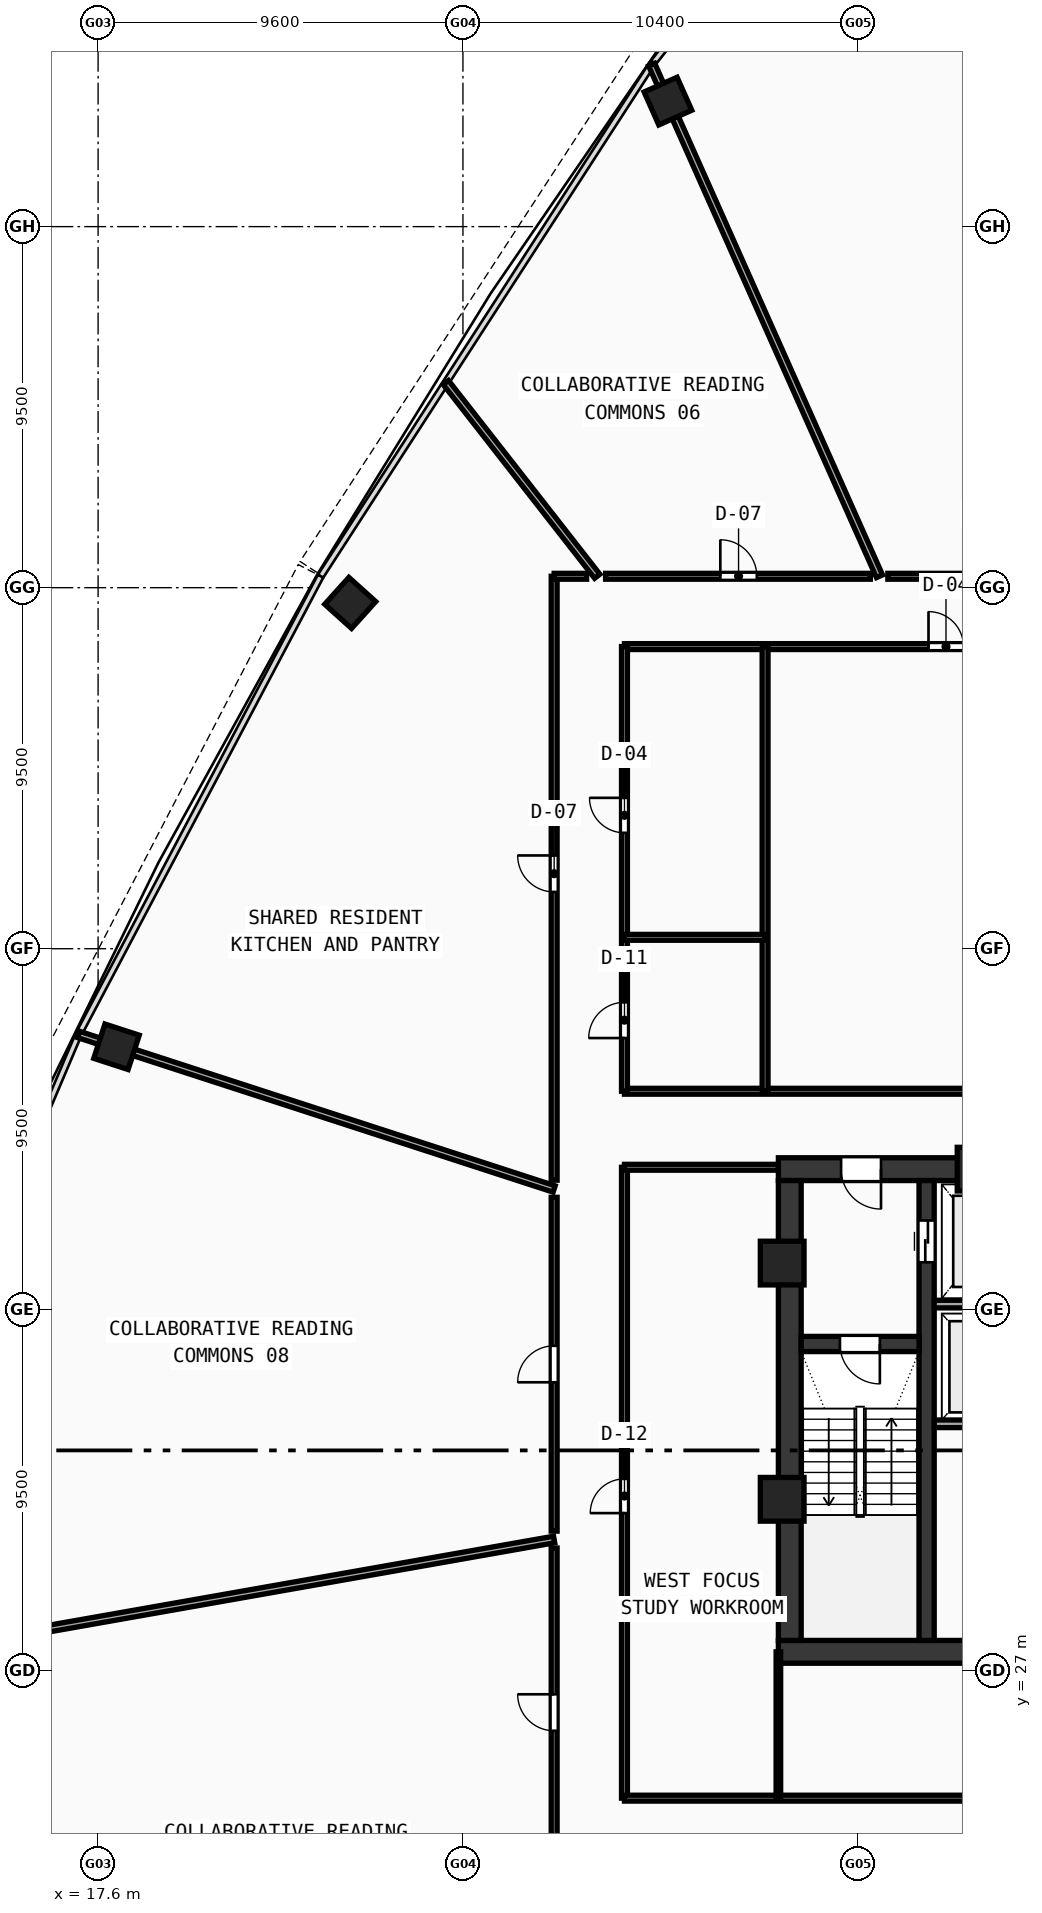
"""IFC4 building model, lengths in metres.
Left out: names, types, materials, properties, quantities, classifications, styles, units other than length and angle.
Written with IfcOpenShell. Run it as: python <this file> out.ifc"""

import sys

from ifc_helpers import new_model, si_unit, direction, frame, frame_2d, origin, origin_with_axes, origin_2d, place, context, subcontext, project, spatial, rectangle, hollow_rectangle, extrude, source, transform, mapped, element, fill, save


model = new_model("IFC4")
c1 = context("Model", 3, precision=1e-05, world=origin(), true_north=direction((0.0, 1.0)))
c2 = subcontext(c1, "Body", "Model", "MODEL_VIEW")
j1 = project(units=[si_unit("LENGTHUNIT", "METRE"), si_unit("PLANEANGLEUNIT", "RADIAN")], contexts=[c1])
p1 = place(None, origin())
s1 = spatial("IfcSite", under=j1, at=p1, CompositionType="ELEMENT")
p2 = place(p1, origin())
s2 = spatial("IfcBuilding", under=s1, at=p2, CompositionType="ELEMENT")
p3 = place(p2, frame((0.0, 0.0, 162.95)))
s3 = spatial("IfcBuildingStorey", under=s2, at=p3, CompositionType="ELEMENT", Elevation=162.95)
p4 = place(p3, frame((35.5, 27.5, 0.0), z_axis=(0.0, 0.0, 1.0), x_axis=(1.0, 0.0, 0.0)))
e1 = element("IfcWall", 1, at=p4, inside=s3, PredefinedType="SHEAR", context=c2, shape_type="SweptSolid", body=[
    extrude(rectangle(XDim=25.0, YDim=0.6, at=frame_2d((12.5, 0.0))), origin(), (0.0, 0.0, 1.0), 3.42),
])
p5 = place(p3, frame((35.5, 40.2, 0.0), z_axis=(0.0, 0.0, 1.0), x_axis=(1.0, 0.0, 0.0)))
e2 = element("IfcWall", 2, at=p5, inside=s3, PredefinedType="SHEAR", context=c2, shape_type="SweptSolid", body=[
    extrude(rectangle(XDim=11.3, YDim=0.6, at=frame_2d((5.65, 0.0))), origin(), (0.0, 0.0, 1.0), 3.42),
])
p6 = place(p5, frame((1.65, 0.0, 0.0)))
e3 = element("IfcOpeningElement", 3, at=p6, cuts=e2, PredefinedType="OPENING", context=c2, shape_type="SweptSolid", body=[
    extrude(rectangle(XDim=1.05, YDim=2.1, at=frame_2d((0.525, 1.05))), frame((0.0, 0.31, 0.0), z_axis=(0.0, -1.0, 0.0), x_axis=(1.0, 0.0, 0.0)), (0.0, 0.0, 1.0), 0.62),
])
p7 = place(p3, frame((35.8, 27.8, 0.0), z_axis=(0.0, 0.0, 1.0), x_axis=(0.0, 1.0, 0.0)))
e4 = element("IfcWall", 4, at=p7, inside=s3, PredefinedType="SHEAR", context=c2, shape_type="SweptSolid", body=[
    extrude(rectangle(XDim=12.1, YDim=0.6, at=frame_2d((6.05, 0.0))), origin(), (0.0, 0.0, 1.0), 3.42),
])
p8 = place(p3, frame((39.4, 27.8, 0.0), z_axis=(0.0, 0.0, 1.0), x_axis=(0.0, 1.0, 0.0)))
e5 = element("IfcWall", 5, at=p8, inside=s3, PredefinedType="SHEAR", context=c2, shape_type="SweptSolid", body=[
    extrude(rectangle(XDim=12.1, YDim=0.4, at=frame_2d((6.05, 0.0))), origin(), (0.0, 0.0, 1.0), 3.42),
])
p9 = place(p8, frame((9.95, 0.0, 0.0)))
e6 = element("IfcOpeningElement", 6, at=p9, cuts=e5, PredefinedType="OPENING", context=c2, shape_type="SweptSolid", body=[
    extrude(rectangle(XDim=1.1, YDim=2.1, at=frame_2d((0.55, 1.05))), frame((0.0, 0.21, 0.0), z_axis=(0.0, -1.0, 0.0), x_axis=(1.0, 0.0, 0.0)), (0.0, 0.0, 1.0), 0.42),
])
p10 = place(p3, frame((36.1, 35.6, 0.0), z_axis=(0.0, 0.0, 1.0), x_axis=(1.0, 0.0, 0.0)))
e7 = element("IfcWall", 7, at=p10, inside=s3, PredefinedType="SHEAR", context=c2, shape_type="SweptSolid", body=[
    extrude(rectangle(XDim=3.1, YDim=0.4, at=frame_2d((1.55, 0.0))), origin(), (0.0, 0.0, 1.0), 3.42),
])
p11 = place(p10, frame((1.02, 0.0, 0.0)))
e8 = element("IfcOpeningElement", 8, at=p11, cuts=e7, PredefinedType="OPENING", context=c2, shape_type="SweptSolid", body=[
    extrude(rectangle(XDim=1.05, YDim=2.1, at=frame_2d((0.525, 1.05))), frame((0.0, 0.21, 0.0), z_axis=(0.0, -1.0, 0.0), x_axis=(1.0, 0.0, 0.0)), (0.0, 0.0, 1.0), 0.42),
])
m1 = source(origin(), c2, "Body", "SweptSolid", [
    extrude(hollow_rectangle(XDim=1.15, YDim=1.15, WallThickness=0.048, at=origin_2d()), origin(), (0.0, 0.0, 1.0), 3.68),
])
for number, where, z_axis, x_axis in (
    (9, (40.781, 40.2, -0.26), (0.0, 0.0, 1.0), (1.0, 0.0, 0.0)),
    (10, (35.6, 37.729, -0.26), (0.0, 0.0, 1.0), (1.0, 0.0, 0.0)),
    (11, (35.6, 31.513, -0.26), (0.0, 0.0, 1.0), (1.0, 0.0, 0.0)),
):
    element("IfcColumn", number, at=place(p3, frame(where, z_axis=z_axis, x_axis=x_axis)), inside=s3, PredefinedType="COLUMN", context=c2, shape_type="MappedRepresentation", body=[
        mapped(m1, transform((0.0, 0.0, 0.0), scale=1.0)),
    ])
m2 = source(origin(), c2, "Body", "SweptSolid", [
    extrude(hollow_rectangle(XDim=0.95, YDim=0.95, WallThickness=0.04, at=origin_2d()), origin(), (0.0, 0.0, 1.0), 3.68),
])
for number, where, z_axis, x_axis in (
    (12, (32.594, 68.303, -0.26), (0.0, 0.0, 1.0), (-0.914, -0.407, 0.0)),
    (13, (24.234, 55.099, -0.26), (0.0, 0.0, 1.0), (-0.669, -0.743, 0.0)),
    (14, (18.085, 43.42, -0.26), (0.0, 0.0, 1.0), (-0.309, -0.951, 0.0)),
):
    element("IfcColumn", number, at=place(p3, frame(where, z_axis=z_axis, x_axis=x_axis)), inside=s3, PredefinedType="COLUMN", context=c2, shape_type="MappedRepresentation", body=[
        mapped(m2, transform((0.0, 0.0, 0.0), scale=1.0)),
    ])
for number, where, z_axis, x_axis in (
    (15, (39.6, 36.65, 0.0), (0.0, 0.0, 1.0), (1.0, 0.0, 0.0)),
    (16, (39.6, 33.5, 0.0), (0.0, 0.0, 1.0), (1.0, 0.0, 0.0)),
):
    element("IfcWall", number, at=place(p3, frame(where, z_axis=z_axis, x_axis=x_axis)), inside=s3, PredefinedType="SOLIDWALL", context=c2, shape_type="SweptSolid", body=[
        extrude(rectangle(XDim=2.72, YDim=0.2, at=frame_2d((1.36, 0.0))), origin(), (0.0, 0.0, 1.0), 3.42),
    ])
p12 = place(p3, frame((31.45, 42.25, 0.0), z_axis=(0.0, 0.0, 1.0), x_axis=(1.0, 0.0, 0.0)))
e17 = element("IfcWall", 17, at=p12, inside=s3, PredefinedType="PARTITIONING", context=c2, shape_type="SweptSolid", body=[
    extrude(rectangle(XDim=33.1, YDim=0.155, at=frame_2d((16.55, 0.0))), origin(), (0.0, 0.0, 1.0), 2.77),
])
p13 = place(p3, frame((31.45, 53.95, 0.0), z_axis=(0.0, 0.0, 1.0), x_axis=(1.0, 0.0, 0.0)))
e18 = element("IfcWall", 18, at=p13, inside=s3, PredefinedType="PARTITIONING", context=c2, shape_type="SweptSolid", body=[
    extrude(rectangle(XDim=33.1, YDim=0.155, at=frame_2d((16.55, 0.0))), origin(), (0.0, 0.0, 1.0), 2.77),
])
p14 = place(p13, frame((8.0, 0.0, 0.0)))
e19 = element("IfcOpeningElement", 19, at=p14, cuts=e18, PredefinedType="OPENING", context=c2, shape_type="SweptSolid", body=[
    extrude(rectangle(XDim=0.92, YDim=2.1, at=frame_2d((0.46, 1.05))), frame((0.0, 0.087, 0.0), z_axis=(0.0, -1.0, 0.0), x_axis=(1.0, 0.0, 0.0)), (0.0, 0.0, 1.0), 0.175),
])
p15 = place(p13, frame((24.05, 0.0, 0.0)))
e20 = element("IfcOpeningElement", 20, at=p15, cuts=e18, PredefinedType="OPENING", context=c2, shape_type="SweptSolid", body=[
    extrude(rectangle(XDim=0.92, YDim=2.1, at=frame_2d((0.46, 1.05))), frame((0.0, 0.087, 0.0), z_axis=(0.0, -1.0, 0.0), x_axis=(1.0, 0.0, 0.0)), (0.0, 0.0, 1.0), 0.175),
])
p16 = place(p3, frame((31.45, 42.25, 0.0), z_axis=(0.0, 0.0, 1.0), x_axis=(0.0, 1.0, 0.0)))
e21 = element("IfcWall", 21, at=p16, inside=s3, PredefinedType="PARTITIONING", context=c2, shape_type="SweptSolid", body=[
    extrude(rectangle(XDim=11.7, YDim=0.155, at=frame_2d((5.85, 0.0))), origin(), (0.0, 0.0, 1.0), 2.77),
])
p17 = place(p16, frame((1.4, 0.0, 0.0)))
e22 = element("IfcOpeningElement", 22, at=p17, cuts=e21, PredefinedType="OPENING", context=c2, shape_type="SweptSolid", body=[
    extrude(rectangle(XDim=0.94, YDim=2.1, at=frame_2d((0.47, 1.05))), frame((0.0, 0.087, 0.0), z_axis=(0.0, -1.0, 0.0), x_axis=(1.0, 0.0, 0.0)), (0.0, 0.0, 1.0), 0.175),
])
p18 = place(p16, frame((6.8, 0.0, 0.0)))
e23 = element("IfcOpeningElement", 23, at=p18, cuts=e21, PredefinedType="OPENING", context=c2, shape_type="SweptSolid", body=[
    extrude(rectangle(XDim=0.92, YDim=2.1, at=frame_2d((0.46, 1.05))), frame((0.0, 0.087, 0.0), z_axis=(0.0, -1.0, 0.0), x_axis=(1.0, 0.0, 0.0)), (0.0, 0.0, 1.0), 0.175),
])
p19 = place(p3, frame((35.15, 42.25, 0.0), z_axis=(0.0, 0.0, 1.0), x_axis=(0.0, 1.0, 0.0)))
e24 = element("IfcWall", 24, at=p19, inside=s3, PredefinedType="PARTITIONING", context=c2, shape_type="SweptSolid", body=[
    extrude(rectangle(XDim=11.7, YDim=0.155, at=frame_2d((5.85, 0.0))), origin(), (0.0, 0.0, 1.0), 2.77),
])
p20 = place(p3, frame((31.45, 46.3, 0.0), z_axis=(0.0, 0.0, 1.0), x_axis=(1.0, 0.0, 0.0)))
e25 = element("IfcWall", 25, at=p20, inside=s3, PredefinedType="PARTITIONING", context=c2, shape_type="SweptSolid", body=[
    extrude(rectangle(XDim=3.7, YDim=0.155, at=frame_2d((1.85, 0.0))), origin(), (0.0, 0.0, 1.0), 2.77),
])
p21 = place(p3, frame((31.45, 23.65, 0.0), z_axis=(0.0, 0.0, 1.0), x_axis=(0.0, 1.0, 0.0)))
e26 = element("IfcWall", 26, at=p21, inside=s3, PredefinedType="PARTITIONING", context=c2, shape_type="SweptSolid", body=[
    extrude(rectangle(XDim=16.6, YDim=0.155, at=frame_2d((8.3, 0.0))), origin(), (0.0, 0.0, 1.0), 2.77),
])
p22 = place(p21, frame((7.5, 0.0, 0.0)))
e27 = element("IfcOpeningElement", 27, at=p22, cuts=e26, PredefinedType="OPENING", context=c2, shape_type="SweptSolid", body=[
    extrude(rectangle(XDim=0.9, YDim=2.08, at=frame_2d((0.45, 1.04))), frame((0.0, 0.087, 0.0), z_axis=(0.0, -1.0, 0.0), x_axis=(1.0, 0.0, 0.0)), (0.0, 0.0, 1.0), 0.175),
])
p23 = place(p3, frame((31.45, 23.65, 0.0), z_axis=(0.0, 0.0, 1.0), x_axis=(1.0, 0.0, 0.0)))
e28 = element("IfcWall", 28, at=p23, inside=s3, PredefinedType="PARTITIONING", context=c2, shape_type="SweptSolid", body=[
    extrude(rectangle(XDim=33.1, YDim=0.155, at=frame_2d((16.55, 0.0))), origin(), (0.0, 0.0, 1.0), 2.77),
])
p24 = place(p23, frame((16.0, 0.0, 0.0)))
e29 = element("IfcOpeningElement", 29, at=p24, cuts=e28, PredefinedType="OPENING", context=c2, shape_type="SweptSolid", body=[
    extrude(rectangle(XDim=0.92, YDim=2.1, at=frame_2d((0.46, 1.05))), frame((0.0, 0.087, 0.0), z_axis=(0.0, -1.0, 0.0), x_axis=(1.0, 0.0, 0.0)), (0.0, 0.0, 1.0), 0.175),
])
p25 = place(p3, frame((31.45, 40.25, 0.0), z_axis=(0.0, 0.0, 1.0), x_axis=(1.0, 0.0, 0.0)))
e30 = element("IfcWall", 30, at=p25, inside=s3, PredefinedType="PARTITIONING", context=c2, shape_type="SweptSolid", body=[
    extrude(rectangle(XDim=4.05, YDim=0.155, at=frame_2d((2.025, 0.0))), origin(), (0.0, 0.0, 1.0), 3.42),
])
p26 = place(p3, frame((35.5, 23.65, 0.0), z_axis=(0.0, 0.0, 1.0), x_axis=(0.0, 1.0, 0.0)))
e31 = element("IfcWall", 31, at=p26, inside=s3, PredefinedType="PARTITIONING", context=c2, shape_type="SweptSolid", body=[
    extrude(rectangle(XDim=3.85, YDim=0.12, at=frame_2d((1.925, 0.0))), origin(), (0.0, 0.0, 1.0), 3.02),
])
p27 = place(p3, frame((38.16, 55.8, 0.0), z_axis=(0.0, 0.0, 1.0), x_axis=(-0.406737891531, 0.913544901793, 0.0)))
e32 = element("IfcWall", 32, at=p27, inside=s3, PredefinedType="PARTITIONING", context=c2, shape_type="SweptSolid", body=[
    extrude(rectangle(XDim=14.736, YDim=0.175, at=frame_2d((7.368, 0.0))), origin(), (0.0, 0.0, 1.0), 2.77),
])
p28 = place(p3, frame((30.734, 55.8, 0.0), z_axis=(0.0, 0.0, 1.0), x_axis=(-0.615677005502, 0.787998619857, 0.0)))
e33 = element("IfcWall", 33, at=p28, inside=s3, PredefinedType="PARTITIONING", context=c2, shape_type="SweptSolid", body=[
    extrude(rectangle(XDim=6.468, YDim=0.175, at=frame_2d((3.234, 0.0))), origin(), (0.0, 0.0, 1.0), 2.77),
])
p29 = place(p3, frame((29.6, 39.678, 0.0), z_axis=(0.0, 0.0, 1.0), x_axis=(-0.951058745875, 0.309010132349, 0.0)))
e34 = element("IfcWall", 34, at=p29, inside=s3, PredefinedType="PARTITIONING", context=c2, shape_type="SweptSolid", body=[
    extrude(rectangle(XDim=13.158, YDim=0.175, at=frame_2d((6.579, 0.0))), origin(), (0.0, 0.0, 1.0), 2.77),
])
p30 = place(p3, frame((29.6, 30.456, 0.0), z_axis=(0.0, 0.0, 1.0), x_axis=(-0.984808700761, -0.173642802629, 0.0)))
e35 = element("IfcWall", 35, at=p30, inside=s3, PredefinedType="PARTITIONING", context=c2, shape_type="SweptSolid", body=[
    extrude(rectangle(XDim=19.934, YDim=0.175, at=frame_2d((9.967, 0.0))), origin(), (0.0, 0.0, 1.0), 2.77),
])
p31 = place(p3, frame((29.6, 21.8, 0.0), z_axis=(0.0, 0.0, 1.0), x_axis=(0.0, 1.0, 0.0)))
e36 = element("IfcWall", 36, at=p31, inside=s3, PredefinedType="PARTITIONING", context=c2, shape_type="SweptSolid", body=[
    extrude(rectangle(XDim=8.432, YDim=0.155, at=frame_2d((4.216, 0.0))), origin(), (0.0, 0.0, 1.0), 3.02),
])
p32 = place(p31, frame((3.623, 0.0, 0.0)))
e37 = element("IfcOpeningElement", 37, at=p32, cuts=e36, PredefinedType="OPENING", context=c2, shape_type="SweptSolid", body=[
    extrude(rectangle(XDim=0.96, YDim=2.12, at=frame_2d((0.48, 1.06))), frame((0.0, 0.087, 0.0), z_axis=(0.0, -1.0, 0.0), x_axis=(1.0, 0.0, 0.0)), (0.0, 0.0, 1.0), 0.175),
])
p33 = place(p3, frame((29.6, 30.675, 0.0), z_axis=(0.0, 0.0, 1.0), x_axis=(0.0, 1.0, 0.0)))
e38 = element("IfcWall", 38, at=p33, inside=s3, PredefinedType="PARTITIONING", context=c2, shape_type="SweptSolid", body=[
    extrude(rectangle(XDim=8.783, YDim=0.155, at=frame_2d((4.392, 0.0))), origin(), (0.0, 0.0, 1.0), 3.42),
])
p34 = place(p33, frame((3.917, 0.0, 0.0)))
e39 = element("IfcOpeningElement", 39, at=p34, cuts=e38, PredefinedType="OPENING", context=c2, shape_type="SweptSolid", body=[
    extrude(rectangle(XDim=0.96, YDim=2.12, at=frame_2d((0.48, 1.06))), frame((0.0, 0.087, 0.0), z_axis=(0.0, -1.0, 0.0), x_axis=(1.0, 0.0, 0.0)), (0.0, 0.0, 1.0), 0.175),
])
p35 = place(p3, frame((29.6, 39.91, 0.0), z_axis=(0.0, 0.0, 1.0), x_axis=(0.0, 1.0, 0.0)))
e40 = element("IfcWall", 40, at=p35, inside=s3, PredefinedType="PARTITIONING", context=c2, shape_type="SweptSolid", body=[
    extrude(rectangle(XDim=15.89, YDim=0.155, at=frame_2d((7.945, 0.0))), origin(), (0.0, 0.0, 1.0), 2.77),
])
p36 = place(p35, frame((7.584, 0.0, 0.0)))
e41 = element("IfcOpeningElement", 41, at=p36, cuts=e40, PredefinedType="OPENING", context=c2, shape_type="SweptSolid", body=[
    extrude(rectangle(XDim=0.96, YDim=2.12, at=frame_2d((0.48, 1.06))), frame((0.0, 0.087, 0.0), z_axis=(0.0, -1.0, 0.0), x_axis=(1.0, 0.0, 0.0)), (0.0, 0.0, 1.0), 0.175),
])
p37 = place(p3, frame((29.6, 55.8, 0.0), z_axis=(0.0, 0.0, 1.0), x_axis=(1.0, 0.0, 0.0)))
e42 = element("IfcWall", 42, at=p37, inside=s3, PredefinedType="PARTITIONING", context=c2, shape_type="SweptSolid", body=[
    extrude(rectangle(XDim=0.854, YDim=0.155, at=frame_2d((0.427, 0.0))), origin(), (0.0, 0.0, 1.0), 3.42),
])
p38 = place(p3, frame((30.953, 55.8, 0.0), z_axis=(0.0, 0.0, 1.0), x_axis=(1.0, 0.0, 0.0)))
e43 = element("IfcWall", 43, at=p38, inside=s3, PredefinedType="PARTITIONING", context=c2, shape_type="SweptSolid", body=[
    extrude(rectangle(XDim=6.966, YDim=0.155, at=frame_2d((3.483, 0.0))), origin(), (0.0, 0.0, 1.0), 3.02),
])
p39 = place(p38, frame((3.019, 0.0, 0.0)))
e44 = element("IfcOpeningElement", 44, at=p39, cuts=e43, PredefinedType="OPENING", context=c2, shape_type="SweptSolid", body=[
    extrude(rectangle(XDim=0.96, YDim=2.12, at=frame_2d((0.48, 1.06))), frame((0.0, 0.087, 0.0), z_axis=(0.0, -1.0, 0.0), x_axis=(1.0, 0.0, 0.0)), (0.0, 0.0, 1.0), 0.175),
])
p40 = place(p3, frame((38.38, 55.8, 0.0), z_axis=(0.0, 0.0, 1.0), x_axis=(1.0, 0.0, 0.0)))
e45 = element("IfcWall", 45, at=p40, inside=s3, PredefinedType="PARTITIONING", context=c2, shape_type="SweptSolid", body=[
    extrude(rectangle(XDim=5.329, YDim=0.155, at=frame_2d((2.665, 0.0))), origin(), (0.0, 0.0, 1.0), 2.77),
])
p41 = place(p40, frame((2.115, 0.0, 0.0)))
e46 = element("IfcOpeningElement", 46, at=p41, cuts=e45, PredefinedType="OPENING", context=c2, shape_type="SweptSolid", body=[
    extrude(rectangle(XDim=0.96, YDim=2.12, at=frame_2d((0.48, 1.06))), frame((0.0, 0.087, 0.0), z_axis=(0.0, -1.0, 0.0), x_axis=(1.0, 0.0, 0.0)), (0.0, 0.0, 1.0), 0.175),
])
m3 = source(origin(), c2, "Body", "SweptSolid", [
    extrude(rectangle(XDim=1.05, YDim=2.1, at=frame_2d((0.525, 1.05))), frame((0.0, 0.025, 0.0), z_axis=(0.0, -1.0, 0.0), x_axis=(1.0, 0.0, 0.0)), (0.0, 0.0, 1.0), 0.05),
])
p42 = place(p11, frame((1.05, 0.0, 0.0), z_axis=(0.0, 0.0, 1.0), x_axis=(-1.0, 0.0, 0.0)))
e47 = element("IfcDoor", 47, at=p42, inside=s3, OperationType="SINGLE_SWING_LEFT", PredefinedType="DOOR", context=c2, shape_type="MappedRepresentation", body=[
    mapped(m3, transform((0.0, 0.0, 0.0), scale=1.0)),
])
fill(e8, e47)
p43 = place(p6, frame((1.05, 0.0, 0.0), z_axis=(0.0, 0.0, 1.0), x_axis=(-1.0, 0.0, 0.0)))
e48 = element("IfcDoor", 48, at=p43, inside=s3, OperationType="SINGLE_SWING_LEFT", PredefinedType="DOOR", context=c2, shape_type="MappedRepresentation", body=[
    mapped(m3, transform((0.0, 0.0, 0.0), scale=1.0)),
])
fill(e3, e48)
m4 = source(origin(), c2, "Body", "SweptSolid", [
    extrude(rectangle(XDim=1.1, YDim=2.1, at=frame_2d((0.55, 1.05))), frame((0.0, 0.025, 0.0), z_axis=(0.0, -1.0, 0.0), x_axis=(1.0, 0.0, 0.0)), (0.0, 0.0, 1.0), 0.05),
])
p44 = place(p9, frame((1.1, 0.0, 0.0), z_axis=(0.0, 0.0, 1.0), x_axis=(-1.0, 0.0, 0.0)))
e49 = element("IfcDoor", 49, at=p44, inside=s3, OperationType="DOUBLE_DOOR_SLIDING", PredefinedType="DOOR", context=c2, shape_type="MappedRepresentation", body=[
    mapped(m4, transform((0.0, 0.0, 0.0), scale=1.0)),
])
fill(e6, e49)
m5 = source(origin(), c2, "Body", "SweptSolid", [
    extrude(rectangle(XDim=0.94, YDim=2.1, at=frame_2d((0.47, 1.05))), frame((0.0, 0.025, 0.0), z_axis=(0.0, -1.0, 0.0), x_axis=(1.0, 0.0, 0.0)), (0.0, 0.0, 1.0), 0.05),
])
p45 = place(p17, origin_with_axes())
e50 = element("IfcDoor", 50, at=p45, inside=s3, OperationType="SINGLE_SWING_LEFT", PredefinedType="DOOR", context=c2, shape_type="MappedRepresentation", body=[
    mapped(m5, transform((0.0, 0.0, 0.0), scale=1.0)),
])
fill(e22, e50)
m6 = source(origin(), c2, "Body", "SweptSolid", [
    extrude(rectangle(XDim=0.92, YDim=2.1, at=frame_2d((0.46, 1.05))), frame((0.0, 0.025, 0.0), z_axis=(0.0, -1.0, 0.0), x_axis=(1.0, 0.0, 0.0)), (0.0, 0.0, 1.0), 0.05),
])
p46 = place(p18, origin_with_axes())
e51 = element("IfcDoor", 51, at=p46, inside=s3, OperationType="SINGLE_SWING_RIGHT", PredefinedType="DOOR", context=c2, shape_type="MappedRepresentation", body=[
    mapped(m6, transform((0.0, 0.0, 0.0), scale=1.0)),
])
fill(e23, e51)
p47 = place(p14, origin_with_axes())
e52 = element("IfcDoor", 52, at=p47, inside=s3, OperationType="SINGLE_SWING_LEFT", PredefinedType="DOOR", context=c2, shape_type="MappedRepresentation", body=[
    mapped(m6, transform((0.0, 0.0, 0.0), scale=1.0)),
])
fill(e19, e52)
m7 = source(origin(), c2, "Body", "SweptSolid", [
    extrude(rectangle(XDim=0.9, YDim=2.08, at=frame_2d((0.45, 1.04))), frame((0.0, 0.025, 0.0), z_axis=(0.0, -1.0, 0.0), x_axis=(1.0, 0.0, 0.0)), (0.0, 0.0, 1.0), 0.05),
])
p48 = place(p22, origin_with_axes())
e53 = element("IfcDoor", 53, at=p48, inside=s3, OperationType="SINGLE_SWING_LEFT", PredefinedType="DOOR", context=c2, shape_type="MappedRepresentation", body=[
    mapped(m7, transform((0.0, 0.0, 0.0), scale=1.0)),
])
fill(e27, e53)
m8 = source(origin(), c2, "Body", "SweptSolid", [
    extrude(rectangle(XDim=0.96, YDim=2.12, at=frame_2d((0.48, 1.06))), frame((0.0, 0.025, 0.0), z_axis=(0.0, -1.0, 0.0), x_axis=(1.0, 0.0, 0.0)), (0.0, 0.0, 1.0), 0.05),
])
p49 = place(p39, origin_with_axes())
e54 = element("IfcDoor", 54, at=p49, inside=s3, OperationType="SINGLE_SWING_LEFT", PredefinedType="DOOR", context=c2, shape_type="MappedRepresentation", body=[
    mapped(m8, transform((0.0, 0.0, 0.0), scale=1.0)),
])
fill(e44, e54)
p50 = place(p36, origin_with_axes())
e55 = element("IfcDoor", 55, at=p50, inside=s3, OperationType="SINGLE_SWING_RIGHT", PredefinedType="DOOR", context=c2, shape_type="MappedRepresentation", body=[
    mapped(m8, transform((0.0, 0.0, 0.0), scale=1.0)),
])
fill(e41, e55)
p51 = place(p34, origin_with_axes())
e56 = element("IfcDoor", 56, at=p51, inside=s3, OperationType="SINGLE_SWING_LEFT", PredefinedType="DOOR", context=c2, shape_type="MappedRepresentation", body=[
    mapped(m8, transform((0.0, 0.0, 0.0), scale=1.0)),
])
fill(e39, e56)
p52 = place(p32, origin_with_axes())
e57 = element("IfcDoor", 57, at=p52, inside=s3, OperationType="SINGLE_SWING_RIGHT", PredefinedType="DOOR", context=c2, shape_type="MappedRepresentation", body=[
    mapped(m8, transform((0.0, 0.0, 0.0), scale=1.0)),
])
fill(e37, e57)
save(model, sys.argv[1])
